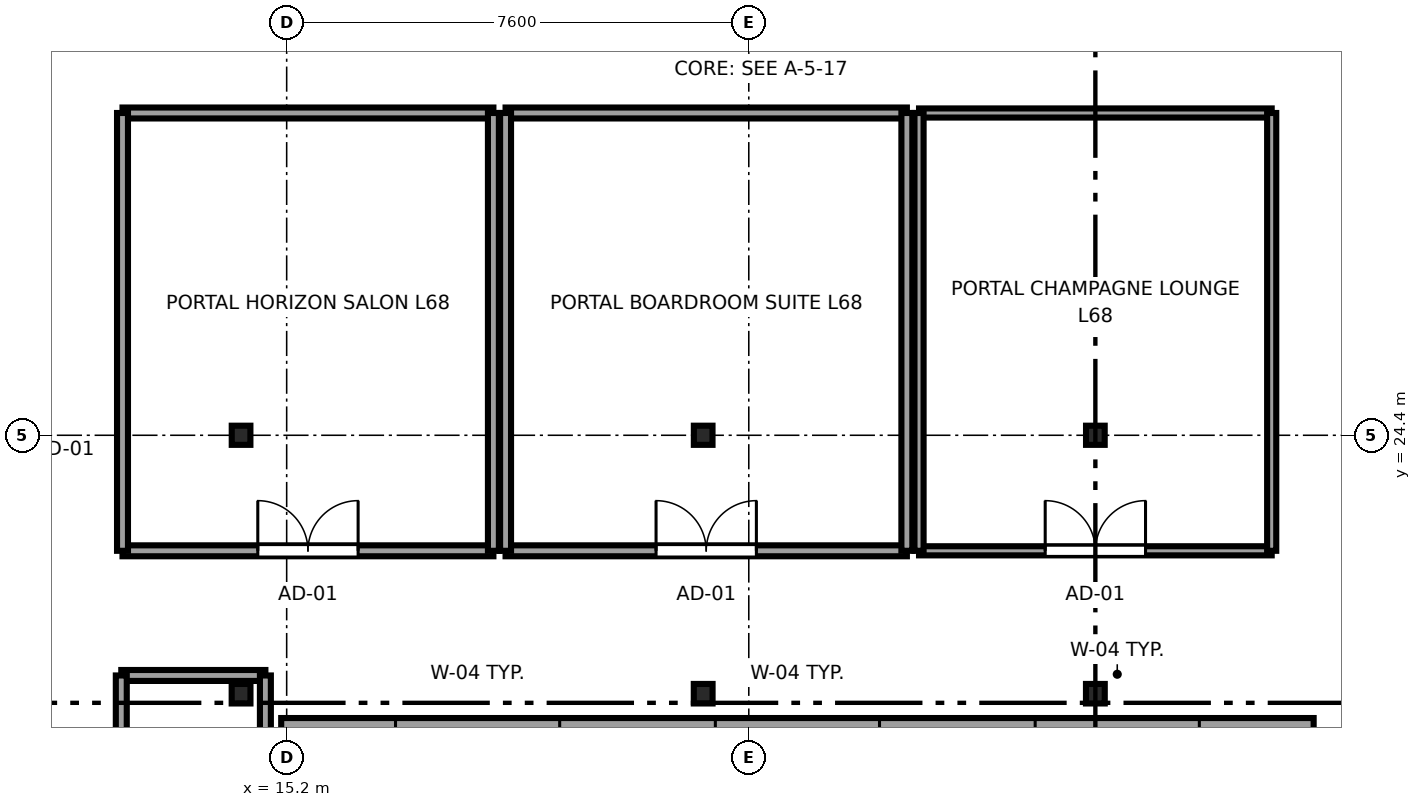
"""IFC4 building model, lengths in metres.
Left out: names, types, materials, properties, quantities, classifications, styles, units other than length and angle.
Written with IfcOpenShell. Run it as: python <this file> out.ifc"""

import sys

from ifc_helpers import new_model, si_unit, direction, frame, frame_2d, origin, origin_2d, place, context, subcontext, project, spatial, rectangle, i_section, extrude, source, transform, mapped, element, fill, save


model = new_model("IFC4")
c1 = context("Model", 3, precision=1e-05, world=origin(), true_north=direction((0.0, 1.0)))
c2 = subcontext(c1, "Body", "Model", "MODEL_VIEW")
j1 = project(units=[si_unit("LENGTHUNIT", "METRE"), si_unit("PLANEANGLEUNIT", "RADIAN")], contexts=[c1])
p1 = place(None, origin())
s1 = spatial("IfcSite", under=j1, at=p1, CompositionType="ELEMENT")
p2 = place(p1, origin())
s2 = spatial("IfcBuilding", under=s1, at=p2, CompositionType="ELEMENT")
p3 = place(p2, frame((0.0, 0.0, 255.85)))
s3 = spatial("IfcBuildingStorey", under=s2, at=p3, CompositionType="ELEMENT", Elevation=255.85)
m1 = source(origin(), c2, "Body", "SweptSolid", [
    extrude(i_section(OverallWidth=0.307, OverallDepth=0.315, WebThickness=0.012, FlangeThickness=0.019, FilletRadius=0.017, at=origin_2d()), origin(), (0.0, 0.0, 1.0), 3.55),
])
for number, where, z_axis, x_axis in (
    (1, (14.45, 24.4, 0.0), (0.0, 0.0, 1.0), (1.0, 0.0, 0.0)),
    (2, (22.05, 24.4, 0.0), (0.0, 0.0, 1.0), (1.0, 0.0, 0.0)),
    (3, (28.5, 24.4, 0.0), (0.0, 0.0, 1.0), (1.0, 0.0, 0.0)),
):
    element("IfcColumn", number, at=place(p3, frame(where, z_axis=z_axis, x_axis=x_axis)), inside=s3, PredefinedType="COLUMN", context=c2, shape_type="MappedRepresentation", body=[
        mapped(m1, transform((0.0, 0.0, 0.0), x_axis=(1.0, 0.0, 0.0), y_axis=(0.0, 1.0, 0.0), z_axis=(0.0, 0.0, 1.0), scale=1.0)),
    ])
m2 = source(origin(), c2, "Body", "SweptSolid", [
    extrude(i_section(OverallWidth=0.309, OverallDepth=0.321, WebThickness=0.014, FlangeThickness=0.022, FilletRadius=0.017, at=origin_2d()), origin(), (0.0, 0.0, 1.0), 3.55),
])
for number, where, z_axis, x_axis in (
    (4, (14.45, 20.15, 0.0), (0.0, 0.0, 1.0), (1.0, 0.0, 0.0)),
    (5, (22.05, 20.15, 0.0), (0.0, 0.0, 1.0), (1.0, 0.0, 0.0)),
    (6, (28.5, 20.15, 0.0), (0.0, 0.0, 1.0), (1.0, 0.0, 0.0)),
):
    element("IfcColumn", number, at=place(p3, frame(where, z_axis=z_axis, x_axis=x_axis)), inside=s3, PredefinedType="COLUMN", context=c2, shape_type="MappedRepresentation", body=[
        mapped(m2, transform((0.0, 0.0, 0.0), x_axis=(1.0, 0.0, 0.0), y_axis=(0.0, 1.0, 0.0), z_axis=(0.0, 0.0, 1.0), scale=1.0)),
    ])
p4 = place(p3, frame((15.11, 19.575, 0.0), z_axis=(0.0, 0.0, 1.0), x_axis=(1.0, 0.0, 0.0)))
e7 = element("IfcWall", 7, at=p4, inside=s3, PredefinedType="SOLIDWALL", context=c2, shape_type="SweptSolid", body=[
    extrude(rectangle(XDim=16.98, YDim=0.35, at=frame_2d((8.49, 0.0))), origin(), (0.0, 0.0, 1.0), 3.37),
])
p5 = place(p4, frame((1.88, 0.0, 0.68)))
e8 = element("IfcOpeningElement", 8, at=p5, cuts=e7, PredefinedType="OPENING", context=c2, shape_type="SweptSolid", body=[
    extrude(rectangle(XDim=2.7, YDim=1.95, at=frame_2d((1.35, 0.975))), frame((0.0, 0.185, 0.0), z_axis=(0.0, -1.0, 0.0), x_axis=(1.0, 0.0, 0.0)), (0.0, 0.0, 1.0), 0.37),
])
p6 = place(p4, frame((7.14, 0.0, 0.68)))
e9 = element("IfcOpeningElement", 9, at=p6, cuts=e7, PredefinedType="OPENING", context=c2, shape_type="SweptSolid", body=[
    extrude(rectangle(XDim=2.7, YDim=1.95, at=frame_2d((1.35, 0.975))), frame((0.0, 0.185, 0.0), z_axis=(0.0, -1.0, 0.0), x_axis=(1.0, 0.0, 0.0)), (0.0, 0.0, 1.0), 0.37),
])
p7 = place(p4, frame((12.4, 0.0, 0.68)))
e10 = element("IfcOpeningElement", 10, at=p7, cuts=e7, PredefinedType="OPENING", context=c2, shape_type="SweptSolid", body=[
    extrude(rectangle(XDim=2.7, YDim=1.95, at=frame_2d((1.35, 0.975))), frame((0.0, 0.185, 0.0), z_axis=(0.0, -1.0, 0.0), x_axis=(1.0, 0.0, 0.0)), (0.0, 0.0, 1.0), 0.37),
])
p8 = place(p3, frame((12.48, 20.45, 0.0), z_axis=(0.0, 0.0, 1.0), x_axis=(1.0, 0.0, 0.0)))
e11 = element("IfcWall", 11, at=p8, inside=s3, PredefinedType="PARTITIONING", context=c2, shape_type="SweptSolid", body=[
    extrude(rectangle(XDim=2.37, YDim=0.18, at=frame_2d((1.185, 0.0))), origin(), (0.0, 0.0, 1.0), 3.37),
])
p9 = place(p3, frame((12.48, 10.2, 0.0), z_axis=(0.0, 0.0, 1.0), x_axis=(0.0, 1.0, 0.0)))
e12 = element("IfcWall", 12, at=p9, inside=s3, PredefinedType="PARTITIONING", context=c2, shape_type="SweptSolid", body=[
    extrude(rectangle(XDim=10.25, YDim=0.18, at=frame_2d((5.125, 0.0))), origin(), (0.0, 0.0, 1.0), 3.37),
])
p10 = place(p9, frame((4.3, 0.0, 0.0)))
e13 = element("IfcOpeningElement", 13, at=p10, cuts=e12, PredefinedType="OPENING", context=c2, shape_type="SweptSolid", body=[
    extrude(rectangle(XDim=1.65, YDim=2.15, at=frame_2d((0.825, 1.075))), frame((0.0, 0.1, 0.0), z_axis=(0.0, -1.0, 0.0), x_axis=(1.0, 0.0, 0.0)), (0.0, 0.0, 1.0), 0.2),
])
p11 = place(p3, frame((14.85, 10.2, 0.0), z_axis=(0.0, 0.0, 1.0), x_axis=(0.0, 1.0, 0.0)))
e14 = element("IfcWall", 14, at=p11, inside=s3, PredefinedType="PARTITIONING", context=c2, shape_type="SweptSolid", body=[
    extrude(rectangle(XDim=10.25, YDim=0.18, at=frame_2d((5.125, 0.0))), origin(), (0.0, 0.0, 1.0), 3.37),
])
p12 = place(p3, frame((12.5, 22.5, 0.0), z_axis=(0.0, 0.0, 1.0), x_axis=(1.0, 0.0, 0.0)))
e15 = element("IfcWall", 15, at=p12, inside=s3, PredefinedType="PARTITIONING", context=c2, shape_type="SweptSolid", body=[
    extrude(rectangle(XDim=6.1, YDim=0.18, at=frame_2d((3.05, 0.0))), origin(), (0.0, 0.0, 1.0), 3.37),
])
p13 = place(p12, frame((2.225, 0.0, 0.0)))
e16 = element("IfcOpeningElement", 16, at=p13, cuts=e15, PredefinedType="OPENING", context=c2, shape_type="SweptSolid", body=[
    extrude(rectangle(XDim=1.65, YDim=2.15, at=frame_2d((0.825, 1.075))), frame((0.0, 0.1, 0.0), z_axis=(0.0, -1.0, 0.0), x_axis=(1.0, 0.0, 0.0)), (0.0, 0.0, 1.0), 0.2),
])
p14 = place(p3, frame((12.5, 29.7, 0.0), z_axis=(0.0, 0.0, 1.0), x_axis=(1.0, 0.0, 0.0)))
e17 = element("IfcWall", 17, at=p14, inside=s3, PredefinedType="PARTITIONING", context=c2, shape_type="SweptSolid", body=[
    extrude(rectangle(XDim=6.1, YDim=0.18, at=frame_2d((3.05, 0.0))), origin(), (0.0, 0.0, 1.0), 3.37),
])
for number, where, z_axis, x_axis in (
    (18, (12.5, 22.5, 0.0), (0.0, 0.0, 1.0), (0.0, 1.0, 0.0)),
    (19, (18.6, 22.5, 0.0), (0.0, 0.0, 1.0), (0.0, 1.0, 0.0)),
):
    element("IfcWall", number, at=place(p3, frame(where, z_axis=z_axis, x_axis=x_axis)), inside=s3, PredefinedType="PARTITIONING", context=c2, shape_type="SweptSolid", body=[
        extrude(rectangle(XDim=7.2, YDim=0.18, at=frame_2d((3.6, 0.0))), origin(), (0.0, 0.0, 1.0), 3.37),
    ])
p15 = place(p3, frame((18.8, 22.5, 0.0), z_axis=(0.0, 0.0, 1.0), x_axis=(1.0, 0.0, 0.0)))
e20 = element("IfcWall", 20, at=p15, inside=s3, PredefinedType="PARTITIONING", context=c2, shape_type="SweptSolid", body=[
    extrude(rectangle(XDim=6.6, YDim=0.18, at=frame_2d((3.3, 0.0))), origin(), (0.0, 0.0, 1.0), 3.37),
])
p16 = place(p15, frame((2.475, 0.0, 0.0)))
e21 = element("IfcOpeningElement", 21, at=p16, cuts=e20, PredefinedType="OPENING", context=c2, shape_type="SweptSolid", body=[
    extrude(rectangle(XDim=1.65, YDim=2.15, at=frame_2d((0.825, 1.075))), frame((0.0, 0.1, 0.0), z_axis=(0.0, -1.0, 0.0), x_axis=(1.0, 0.0, 0.0)), (0.0, 0.0, 1.0), 0.2),
])
p17 = place(p3, frame((18.8, 29.7, 0.0), z_axis=(0.0, 0.0, 1.0), x_axis=(1.0, 0.0, 0.0)))
e22 = element("IfcWall", 22, at=p17, inside=s3, PredefinedType="PARTITIONING", context=c2, shape_type="SweptSolid", body=[
    extrude(rectangle(XDim=6.6, YDim=0.18, at=frame_2d((3.3, 0.0))), origin(), (0.0, 0.0, 1.0), 3.37),
])
for number, where, z_axis, x_axis in (
    (23, (18.8, 22.5, 0.0), (0.0, 0.0, 1.0), (0.0, 1.0, 0.0)),
    (24, (25.4, 22.5, 0.0), (0.0, 0.0, 1.0), (0.0, 1.0, 0.0)),
):
    element("IfcWall", number, at=place(p3, frame(where, z_axis=z_axis, x_axis=x_axis)), inside=s3, PredefinedType="PARTITIONING", context=c2, shape_type="SweptSolid", body=[
        extrude(rectangle(XDim=7.2, YDim=0.18, at=frame_2d((3.6, 0.0))), origin(), (0.0, 0.0, 1.0), 3.37),
    ])
p18 = place(p3, frame((25.6, 22.5, 0.0), z_axis=(0.0, 0.0, 1.0), x_axis=(1.0, 0.0, 0.0)))
e25 = element("IfcWall", 25, at=p18, inside=s3, PredefinedType="PARTITIONING", context=c2, shape_type="SweptSolid", body=[
    extrude(rectangle(XDim=5.8, YDim=0.15, at=frame_2d((2.9, 0.0))), origin(), (0.0, 0.0, 1.0), 3.37),
])
p19 = place(p18, frame((2.075, 0.0, 0.0)))
e26 = element("IfcOpeningElement", 26, at=p19, cuts=e25, PredefinedType="OPENING", context=c2, shape_type="SweptSolid", body=[
    extrude(rectangle(XDim=1.65, YDim=2.15, at=frame_2d((0.825, 1.075))), frame((0.0, 0.085, 0.0), z_axis=(0.0, -1.0, 0.0), x_axis=(1.0, 0.0, 0.0)), (0.0, 0.0, 1.0), 0.17),
])
p20 = place(p3, frame((25.6, 29.7, 0.0), z_axis=(0.0, 0.0, 1.0), x_axis=(1.0, 0.0, 0.0)))
e27 = element("IfcWall", 27, at=p20, inside=s3, PredefinedType="PARTITIONING", context=c2, shape_type="SweptSolid", body=[
    extrude(rectangle(XDim=5.8, YDim=0.15, at=frame_2d((2.9, 0.0))), origin(), (0.0, 0.0, 1.0), 3.37),
])
for number, where, z_axis, x_axis in (
    (28, (25.6, 22.5, 0.0), (0.0, 0.0, 1.0), (0.0, 1.0, 0.0)),
    (29, (31.4, 22.5, 0.0), (0.0, 0.0, 1.0), (0.0, 1.0, 0.0)),
):
    element("IfcWall", number, at=place(p3, frame(where, z_axis=z_axis, x_axis=x_axis)), inside=s3, PredefinedType="PARTITIONING", context=c2, shape_type="SweptSolid", body=[
        extrude(rectangle(XDim=7.2, YDim=0.15, at=frame_2d((3.6, 0.0))), origin(), (0.0, 0.0, 1.0), 3.37),
    ])
m3 = source(origin(), c2, "Body", "SweptSolid", [
    extrude(rectangle(XDim=2.7, YDim=1.95, at=frame_2d((1.35, 0.975))), frame((0.0, 0.09, 0.0), z_axis=(0.0, -1.0, 0.0), x_axis=(1.0, 0.0, 0.0)), (0.0, 0.0, 1.0), 0.06),
])
p21 = place(p5, origin())
e30 = element("IfcWindow", 30, at=p21, inside=s3, PartitioningType="TRIPLE_PANEL_HORIZONTAL", PredefinedType="WINDOW", context=c2, shape_type="MappedRepresentation", body=[
    mapped(m3, transform((0.0, 0.0, 0.0), x_axis=(1.0, 0.0, 0.0), y_axis=(0.0, 1.0, 0.0), z_axis=(0.0, 0.0, 1.0), scale=1.0)),
])
fill(e8, e30)
p22 = place(p6, origin())
e31 = element("IfcWindow", 31, at=p22, inside=s3, PartitioningType="TRIPLE_PANEL_HORIZONTAL", PredefinedType="WINDOW", context=c2, shape_type="MappedRepresentation", body=[
    mapped(m3, transform((0.0, 0.0, 0.0), x_axis=(1.0, 0.0, 0.0), y_axis=(0.0, 1.0, 0.0), z_axis=(0.0, 0.0, 1.0), scale=1.0)),
])
fill(e9, e31)
p23 = place(p7, origin())
e32 = element("IfcWindow", 32, at=p23, inside=s3, PartitioningType="TRIPLE_PANEL_HORIZONTAL", PredefinedType="WINDOW", context=c2, shape_type="MappedRepresentation", body=[
    mapped(m3, transform((0.0, 0.0, 0.0), x_axis=(1.0, 0.0, 0.0), y_axis=(0.0, 1.0, 0.0), z_axis=(0.0, 0.0, 1.0), scale=1.0)),
])
fill(e10, e32)
m4 = source(origin(), c2, "Body", "SweptSolid", [
    extrude(rectangle(XDim=1.65, YDim=2.15, at=frame_2d((0.825, 1.075))), frame((0.0, 0.025, 0.0), z_axis=(0.0, -1.0, 0.0), x_axis=(1.0, 0.0, 0.0)), (0.0, 0.0, 1.0), 0.05),
])
p24 = place(p13, origin())
e33 = element("IfcDoor", 33, at=p24, inside=s3, OperationType="DOUBLE_DOOR_SINGLE_SWING", PredefinedType="DOOR", context=c2, shape_type="MappedRepresentation", body=[
    mapped(m4, transform((0.0, 0.0, 0.0), x_axis=(1.0, 0.0, 0.0), y_axis=(0.0, 1.0, 0.0), z_axis=(0.0, 0.0, 1.0), scale=1.0)),
])
fill(e16, e33)
p25 = place(p16, origin())
e34 = element("IfcDoor", 34, at=p25, inside=s3, OperationType="DOUBLE_DOOR_SINGLE_SWING", PredefinedType="DOOR", context=c2, shape_type="MappedRepresentation", body=[
    mapped(m4, transform((0.0, 0.0, 0.0), x_axis=(1.0, 0.0, 0.0), y_axis=(0.0, 1.0, 0.0), z_axis=(0.0, 0.0, 1.0), scale=1.0)),
])
fill(e21, e34)
p26 = place(p19, origin())
e35 = element("IfcDoor", 35, at=p26, inside=s3, OperationType="DOUBLE_DOOR_SINGLE_SWING", PredefinedType="DOOR", context=c2, shape_type="MappedRepresentation", body=[
    mapped(m4, transform((0.0, 0.0, 0.0), x_axis=(1.0, 0.0, 0.0), y_axis=(0.0, 1.0, 0.0), z_axis=(0.0, 0.0, 1.0), scale=1.0)),
])
fill(e26, e35)
save(model, sys.argv[1])
